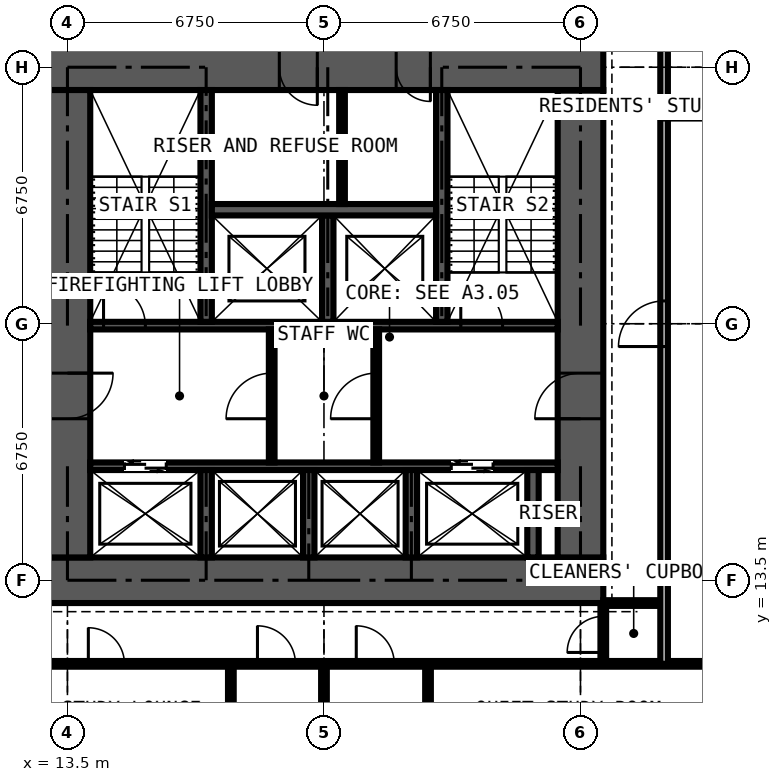
"""IFC4 building model, lengths in metres.
Left out: names, types, materials, properties, quantities, classifications, styles, units other than length and angle.
Written with IfcOpenShell. Run it as: python <this file> out.ifc"""

import sys

from ifc_helpers import new_model, si_unit, direction, frame, frame_2d, origin, place, context, subcontext, project, spatial, rectangle, extrude, element, fill, save


model = new_model("IFC4")
c1 = context("Model", 3, precision=1e-05, world=origin(), true_north=direction((0.0, 1.0)))
c2 = subcontext(c1, "Body", "Model", "MODEL_VIEW")
j1 = project(units=[si_unit("LENGTHUNIT", "METRE"), si_unit("PLANEANGLEUNIT", "RADIAN")], contexts=[c1])
p1 = place(None, origin())
s1 = spatial("IfcSite", under=j1, at=p1, CompositionType="ELEMENT")
p2 = place(p1, origin())
s2 = spatial("IfcBuilding", under=s1, at=p2, CompositionType="ELEMENT")
p3 = place(p2, frame((0.0, 0.0, 83.7)))
s3 = spatial("IfcBuildingStorey", under=s2, at=p3, CompositionType="ELEMENT", Elevation=83.7)
p4 = place(p3, frame((12.9, 13.5, 0.0), z_axis=(0.0, 0.0, 1.0), x_axis=(1.0, 0.0, 0.0)))
e1 = element("IfcWall", 1, at=p4, inside=s3, PredefinedType="SHEAR", context=c2, shape_type="SweptSolid", body=[
    extrude(rectangle(XDim=14.7, YDim=1.2, at=frame_2d((7.35, 0.0))), origin(), (0.0, 0.0, 1.0), 3.6),
])
p5 = place(p3, frame((27.0, 14.1, 0.0), z_axis=(0.0, 0.0, 1.0), x_axis=(0.0, 1.0, 0.0)))
e2 = element("IfcWall", 2, at=p5, inside=s3, PredefinedType="SHEAR", context=c2, shape_type="SweptSolid", body=[
    extrude(rectangle(XDim=12.3, YDim=1.2, at=frame_2d((6.15, 0.0))), origin(), (0.0, 0.0, 1.0), 3.6),
])
p6 = place(p5, frame((3.65, 0.0, 0.0)))
e3 = element("IfcOpeningElement", 3, at=p6, cuts=e2, PredefinedType="OPENING", context=c2, shape_type="SweptSolid", body=[
    extrude(rectangle(XDim=1.2, YDim=2.2, at=frame_2d((0.6, 1.1))), frame((0.0, 0.61, 0.0), z_axis=(0.0, -1.0, 0.0), x_axis=(1.0, 0.0, 0.0)), (0.0, 0.0, 1.0), 1.22),
])
p7 = place(p3, frame((27.6, 27.0, 0.0), z_axis=(0.0, 0.0, 1.0), x_axis=(-1.0, 0.0, 0.0)))
e4 = element("IfcWall", 4, at=p7, inside=s3, PredefinedType="SHEAR", context=c2, shape_type="SweptSolid", body=[
    extrude(rectangle(XDim=14.7, YDim=1.2, at=frame_2d((7.35, 0.0))), origin(), (0.0, 0.0, 1.0), 3.6),
])
p8 = place(p7, frame((4.55, 0.0, 0.0)))
e5 = element("IfcOpeningElement", 5, at=p8, cuts=e4, PredefinedType="OPENING", context=c2, shape_type="SweptSolid", body=[
    extrude(rectangle(XDim=0.9, YDim=2.2, at=frame_2d((0.45, 1.1))), frame((0.0, 0.61, 0.0), z_axis=(0.0, -1.0, 0.0), x_axis=(1.0, 0.0, 0.0)), (0.0, 0.0, 1.0), 1.22),
])
p9 = place(p7, frame((7.525, 0.0, 0.0)))
e6 = element("IfcOpeningElement", 6, at=p9, cuts=e4, PredefinedType="OPENING", context=c2, shape_type="SweptSolid", body=[
    extrude(rectangle(XDim=1.0, YDim=2.2, at=frame_2d((0.5, 1.1))), frame((0.0, 0.61, 0.0), z_axis=(0.0, -1.0, 0.0), x_axis=(1.0, 0.0, 0.0)), (0.0, 0.0, 1.0), 1.22),
])
p10 = place(p3, frame((13.5, 26.4, 0.0), z_axis=(0.0, 0.0, 1.0), x_axis=(0.0, -1.0, 0.0)))
e7 = element("IfcWall", 7, at=p10, inside=s3, PredefinedType="SHEAR", context=c2, shape_type="SweptSolid", body=[
    extrude(rectangle(XDim=12.3, YDim=1.2, at=frame_2d((6.15, 0.0))), origin(), (0.0, 0.0, 1.0), 3.6),
])
p11 = place(p10, frame((7.45, 0.0, 0.0)))
e8 = element("IfcOpeningElement", 8, at=p11, cuts=e7, PredefinedType="OPENING", context=c2, shape_type="SweptSolid", body=[
    extrude(rectangle(XDim=1.2, YDim=2.2, at=frame_2d((0.6, 1.1))), frame((0.0, 0.61, 0.0), z_axis=(0.0, -1.0, 0.0), x_axis=(1.0, 0.0, 0.0)), (0.0, 0.0, 1.0), 1.22),
])
p12 = place(p3, frame((14.1, 16.5, 0.0), z_axis=(0.0, 0.0, 1.0), x_axis=(1.0, 0.0, 0.0)))
e9 = element("IfcWall", 9, at=p12, inside=s3, PredefinedType="SHEAR", context=c2, shape_type="SweptSolid", body=[
    extrude(rectangle(XDim=12.3, YDim=0.2, at=frame_2d((6.15, 0.0))), origin(), (0.0, 0.0, 1.0), 3.6),
])
p13 = place(p12, frame((0.9, 0.0, 0.0)))
e10 = element("IfcOpeningElement", 10, at=p13, cuts=e9, PredefinedType="OPENING", context=c2, shape_type="SweptSolid", body=[
    extrude(rectangle(XDim=1.1, YDim=2.2, at=frame_2d((0.55, 1.1))), frame((0.0, 0.11, 0.0), z_axis=(0.0, -1.0, 0.0), x_axis=(1.0, 0.0, 0.0)), (0.0, 0.0, 1.0), 0.22),
])
p14 = place(p12, frame((9.5, 0.0, 0.0)))
e11 = element("IfcOpeningElement", 11, at=p14, cuts=e9, PredefinedType="OPENING", context=c2, shape_type="SweptSolid", body=[
    extrude(rectangle(XDim=1.1, YDim=2.2, at=frame_2d((0.55, 1.1))), frame((0.0, 0.11, 0.0), z_axis=(0.0, -1.0, 0.0), x_axis=(1.0, 0.0, 0.0)), (0.0, 0.0, 1.0), 0.22),
])
p15 = place(p3, frame((14.1, 20.2, 0.0), z_axis=(0.0, 0.0, 1.0), x_axis=(1.0, 0.0, 0.0)))
e12 = element("IfcWall", 12, at=p15, inside=s3, PredefinedType="SHEAR", context=c2, shape_type="SweptSolid", body=[
    extrude(rectangle(XDim=12.3, YDim=0.2, at=frame_2d((6.15, 0.0))), origin(), (0.0, 0.0, 1.0), 3.6),
])
p16 = place(p15, frame((0.35, 0.0, 0.0)))
e13 = element("IfcOpeningElement", 13, at=p16, cuts=e12, PredefinedType="OPENING", context=c2, shape_type="SweptSolid", body=[
    extrude(rectangle(XDim=1.1, YDim=2.2, at=frame_2d((0.55, 1.1))), frame((0.0, 0.11, 0.0), z_axis=(0.0, -1.0, 0.0), x_axis=(1.0, 0.0, 0.0)), (0.0, 0.0, 1.0), 0.22),
])
p17 = place(p15, frame((9.75, 0.0, 0.0)))
e14 = element("IfcOpeningElement", 14, at=p17, cuts=e12, PredefinedType="OPENING", context=c2, shape_type="SweptSolid", body=[
    extrude(rectangle(XDim=1.1, YDim=2.2, at=frame_2d((0.55, 1.1))), frame((0.0, 0.11, 0.0), z_axis=(0.0, -1.0, 0.0), x_axis=(1.0, 0.0, 0.0)), (0.0, 0.0, 1.0), 0.22),
])
for number, where, z_axis, x_axis in (
    (15, (17.15, 20.3, 0.0), (0.0, 0.0, 1.0), (0.0, 1.0, 0.0)),
    (16, (23.35, 20.3, 0.0), (0.0, 0.0, 1.0), (0.0, 1.0, 0.0)),
):
    element("IfcWall", number, at=place(p3, frame(where, z_axis=z_axis, x_axis=x_axis)), inside=s3, PredefinedType="SHEAR", context=c2, shape_type="SweptSolid", body=[
        extrude(rectangle(XDim=6.1, YDim=0.3, at=frame_2d((3.05, 0.0))), origin(), (0.0, 0.0, 1.0), 3.6),
    ])
p18 = place(p3, frame((20.35, 20.3, 0.0), z_axis=(0.0, 0.0, 1.0), x_axis=(0.0, 1.0, 0.0)))
e17 = element("IfcWall", 17, at=p18, inside=s3, PredefinedType="SHEAR", context=c2, shape_type="SweptSolid", body=[
    extrude(rectangle(XDim=2.8, YDim=0.3, at=frame_2d((1.4, 0.0))), origin(), (0.0, 0.0, 1.0), 3.6),
])
p19 = place(p3, frame((17.3, 23.25, 0.0), z_axis=(0.0, 0.0, 1.0), x_axis=(1.0, 0.0, 0.0)))
e18 = element("IfcWall", 18, at=p19, inside=s3, PredefinedType="SHEAR", context=c2, shape_type="SweptSolid", body=[
    extrude(rectangle(XDim=5.9, YDim=0.3, at=frame_2d((2.95, 0.0))), origin(), (0.0, 0.0, 1.0), 3.6),
])
for number, where, z_axis, x_axis in (
    (19, (17.15, 14.1, 0.0), (0.0, 0.0, 1.0), (0.0, 1.0, 0.0)),
    (20, (19.85, 14.1, 0.0), (0.0, 0.0, 1.0), (0.0, 1.0, 0.0)),
    (21, (22.55, 14.1, 0.0), (0.0, 0.0, 1.0), (0.0, 1.0, 0.0)),
    (22, (25.75, 14.1, 0.0), (0.0, 0.0, 1.0), (0.0, 1.0, 0.0)),
):
    element("IfcWall", number, at=place(p3, frame(where, z_axis=z_axis, x_axis=x_axis)), inside=s3, PredefinedType="SHEAR", context=c2, shape_type="SweptSolid", body=[
        extrude(rectangle(XDim=2.3, YDim=0.3, at=frame_2d((1.15, 0.0))), origin(), (0.0, 0.0, 1.0), 3.6),
    ])
p20 = place(p3, frame((18.875, 16.6, 0.0), z_axis=(0.0, 0.0, 1.0), x_axis=(0.0, 1.0, 0.0)))
e23 = element("IfcWall", 23, at=p20, inside=s3, PredefinedType="PARTITIONING", context=c2, shape_type="SweptSolid", body=[
    extrude(rectangle(XDim=3.5, YDim=0.15, at=frame_2d((1.75, 0.0))), origin(), (0.0, 0.0, 1.0), 3.375),
])
p21 = place(p20, frame((1.15, 0.0, 0.0)))
e24 = element("IfcOpeningElement", 24, at=p21, cuts=e23, PredefinedType="OPENING", context=c2, shape_type="SweptSolid", body=[
    extrude(rectangle(XDim=1.2, YDim=2.2, at=frame_2d((0.6, 1.1))), frame((0.0, 0.085, 0.0), z_axis=(0.0, -1.0, 0.0), x_axis=(1.0, 0.0, 0.0)), (0.0, 0.0, 1.0), 0.17),
])
p22 = place(p3, frame((21.625, 16.6, 0.0), z_axis=(0.0, 0.0, 1.0), x_axis=(0.0, 1.0, 0.0)))
e25 = element("IfcWall", 25, at=p22, inside=s3, PredefinedType="PARTITIONING", context=c2, shape_type="SweptSolid", body=[
    extrude(rectangle(XDim=3.5, YDim=0.15, at=frame_2d((1.75, 0.0))), origin(), (0.0, 0.0, 1.0), 3.375),
])
p23 = place(p22, frame((1.15, 0.0, 0.0)))
e26 = element("IfcOpeningElement", 26, at=p23, cuts=e25, PredefinedType="OPENING", context=c2, shape_type="SweptSolid", body=[
    extrude(rectangle(XDim=1.2, YDim=2.2, at=frame_2d((0.6, 1.1))), frame((0.0, 0.085, 0.0), z_axis=(0.0, -1.0, 0.0), x_axis=(1.0, 0.0, 0.0)), (0.0, 0.0, 1.0), 0.17),
])
p24 = place(p3, frame((20.725, 23.4, 0.0), z_axis=(0.0, 0.0, 1.0), x_axis=(0.0, 1.0, 0.0)))
e27 = element("IfcWall", 27, at=p24, inside=s3, PredefinedType="PARTITIONING", context=c2, shape_type="SweptSolid", body=[
    extrude(rectangle(XDim=3.0, YDim=0.15, at=frame_2d((1.5, 0.0))), origin(), (0.0, 0.0, 1.0), 3.375),
])
p25 = place(p3, frame((10.125, 11.3, 0.0), z_axis=(0.0, 0.0, 1.0), x_axis=(1.0, 0.0, 0.0)))
e28 = element("IfcWall", 28, at=p25, inside=s3, PredefinedType="PARTITIONING", context=c2, shape_type="SweptSolid", body=[
    extrude(rectangle(XDim=20.675, YDim=0.15, at=frame_2d((10.337, 0.0))), origin(), (0.0, 0.0, 1.0), 3.375),
])
p26 = place(p25, frame((8.375, 0.0, 0.0)))
e29 = element("IfcOpeningElement", 29, at=p26, cuts=e28, PredefinedType="OPENING", context=c2, shape_type="SweptSolid", body=[
    extrude(rectangle(XDim=1.0, YDim=2.2, at=frame_2d((0.5, 1.1))), frame((0.0, 0.085, 0.0), z_axis=(0.0, -1.0, 0.0), x_axis=(1.0, 0.0, 0.0)), (0.0, 0.0, 1.0), 0.17),
])
p27 = place(p25, frame((10.975, 0.0, 0.0)))
e30 = element("IfcOpeningElement", 30, at=p27, cuts=e28, PredefinedType="OPENING", context=c2, shape_type="SweptSolid", body=[
    extrude(rectangle(XDim=1.0, YDim=2.2, at=frame_2d((0.5, 1.1))), frame((0.0, 0.085, 0.0), z_axis=(0.0, -1.0, 0.0), x_axis=(1.0, 0.0, 0.0)), (0.0, 0.0, 1.0), 0.17),
])
p28 = place(p25, frame((3.925, 0.0, 0.0)))
e31 = element("IfcOpeningElement", 31, at=p28, cuts=e28, PredefinedType="OPENING", context=c2, shape_type="SweptSolid", body=[
    extrude(rectangle(XDim=0.95, YDim=2.2, at=frame_2d((0.475, 1.1))), frame((0.0, 0.085, 0.0), z_axis=(0.0, -1.0, 0.0), x_axis=(1.0, 0.0, 0.0)), (0.0, 0.0, 1.0), 0.17),
])
p29 = place(p3, frame((17.8, 5.65, 0.0), z_axis=(0.0, 0.0, 1.0), x_axis=(0.0, 1.0, 0.0)))
e32 = element("IfcWall", 32, at=p29, inside=s3, PredefinedType="PARTITIONING", context=c2, shape_type="SweptSolid", body=[
    extrude(rectangle(XDim=5.65, YDim=0.15, at=frame_2d((2.825, 0.0))), origin(), (0.0, 0.0, 1.0), 3.375),
])
p30 = place(p3, frame((20.25, -0.734, 0.0), z_axis=(0.0, 0.0, 1.0), x_axis=(0.0, 1.0, 0.0)))
e33 = element("IfcWall", 33, at=p30, inside=s3, PredefinedType="PARTITIONING", context=c2, shape_type="SweptSolid", body=[
    extrude(rectangle(XDim=12.034, YDim=0.15, at=frame_2d((6.017, 0.0))), origin(), (0.0, 0.0, 1.0), 2.61),
])
p31 = place(p3, frame((22.988, 5.65, 0.0), z_axis=(0.0, 0.0, 1.0), x_axis=(0.0, 1.0, 0.0)))
e34 = element("IfcWall", 34, at=p31, inside=s3, PredefinedType="PARTITIONING", context=c2, shape_type="SweptSolid", body=[
    extrude(rectangle(XDim=5.65, YDim=0.15, at=frame_2d((2.825, 0.0))), origin(), (0.0, 0.0, 1.0), 3.375),
])
p32 = place(p3, frame((27.6, 11.3, 0.0), z_axis=(0.0, 0.0, 1.0), x_axis=(0.0, 1.0, 0.0)))
e35 = element("IfcWall", 35, at=p32, inside=s3, PredefinedType="PARTITIONING", context=c2, shape_type="SweptSolid", body=[
    extrude(rectangle(XDim=1.6, YDim=0.15, at=frame_2d((0.8, 0.0))), origin(), (0.0, 0.0, 1.0), 3.375),
])
p33 = place(p32, frame((0.3, 0.0, 0.0)))
e36 = element("IfcOpeningElement", 36, at=p33, cuts=e35, PredefinedType="OPENING", context=c2, shape_type="SweptSolid", body=[
    extrude(rectangle(XDim=0.95, YDim=2.2, at=frame_2d((0.475, 1.1))), frame((0.0, 0.085, 0.0), z_axis=(0.0, -1.0, 0.0), x_axis=(1.0, 0.0, 0.0)), (0.0, 0.0, 1.0), 0.17),
])
p34 = place(p3, frame((27.6, 12.9, 0.0), z_axis=(0.0, 0.0, 1.0), x_axis=(1.0, 0.0, 0.0)))
e37 = element("IfcWall", 37, at=p34, inside=s3, PredefinedType="PARTITIONING", context=c2, shape_type="SweptSolid", body=[
    extrude(rectangle(XDim=1.6, YDim=0.15, at=frame_2d((0.8, 0.0))), origin(), (0.0, 0.0, 1.0), 2.806),
])
p35 = place(p3, frame((29.2, 11.3, 0.0), z_axis=(0.0, 0.0, 1.0), x_axis=(0.0, 1.0, 0.0)))
e38 = element("IfcWall", 38, at=p35, inside=s3, PredefinedType="PARTITIONING", context=c2, shape_type="SweptSolid", body=[
    extrude(rectangle(XDim=17.9, YDim=0.2, at=frame_2d((8.95, 0.0))), origin(), (0.0, 0.0, 1.0), 3.375),
])
p36 = place(p35, frame((8.35, 0.0, 0.0)))
e39 = element("IfcOpeningElement", 39, at=p36, cuts=e38, PredefinedType="OPENING", context=c2, shape_type="SweptSolid", body=[
    extrude(rectangle(XDim=1.2, YDim=2.2, at=frame_2d((0.6, 1.1))), frame((0.0, 0.11, 0.0), z_axis=(0.0, -1.0, 0.0), x_axis=(1.0, 0.0, 0.0)), (0.0, 0.0, 1.0), 0.22),
])
p37 = place(p3, frame((29.2, 25.7, 0.0), z_axis=(0.0, 0.0, 1.0), x_axis=(1.0, 0.0, 0.0)))
e40 = element("IfcWall", 40, at=p37, inside=s3, PredefinedType="SHEAR", context=c2, shape_type="SweptSolid", body=[
    extrude(rectangle(XDim=3.45, YDim=0.1, at=frame_2d((1.725, 0.0))), origin(), (0.0, 0.0, 1.0), 3.375),
])
p38 = place(p13, origin())
e41 = element("IfcDoor", 41, at=p38, inside=s3, OperationType="DOUBLE_DOOR_SLIDING", PredefinedType="DOOR", context=c2, shape_type="SweptSolid", body=[
    extrude(rectangle(XDim=1.1, YDim=2.2, at=frame_2d((0.55, 1.1))), frame((0.0, 0.025, 0.0), z_axis=(0.0, -1.0, 0.0), x_axis=(1.0, 0.0, 0.0)), (0.0, 0.0, 1.0), 0.05),
])
fill(e10, e41)
p39 = place(p14, origin())
e42 = element("IfcDoor", 42, at=p39, inside=s3, OperationType="DOUBLE_DOOR_SLIDING", PredefinedType="DOOR", context=c2, shape_type="SweptSolid", body=[
    extrude(rectangle(XDim=1.1, YDim=2.2, at=frame_2d((0.55, 1.1))), frame((0.0, 0.025, 0.0), z_axis=(0.0, -1.0, 0.0), x_axis=(1.0, 0.0, 0.0)), (0.0, 0.0, 1.0), 0.05),
])
fill(e11, e42)
p40 = place(p11, origin())
e43 = element("IfcDoor", 43, at=p40, inside=s3, OperationType="DOUBLE_DOOR_SINGLE_SWING", PredefinedType="DOOR", context=c2, shape_type="SweptSolid", body=[
    extrude(rectangle(XDim=1.2, YDim=2.2, at=frame_2d((0.6, 1.1))), frame((0.0, 0.025, 0.0), z_axis=(0.0, -1.0, 0.0), x_axis=(1.0, 0.0, 0.0)), (0.0, 0.0, 1.0), 0.05),
])
fill(e8, e43)
p41 = place(p6, origin())
e44 = element("IfcDoor", 44, at=p41, inside=s3, OperationType="DOUBLE_DOOR_SINGLE_SWING", PredefinedType="DOOR", context=c2, shape_type="SweptSolid", body=[
    extrude(rectangle(XDim=1.2, YDim=2.2, at=frame_2d((0.6, 1.1))), frame((0.0, 0.025, 0.0), z_axis=(0.0, -1.0, 0.0), x_axis=(1.0, 0.0, 0.0)), (0.0, 0.0, 1.0), 0.05),
])
fill(e3, e44)
p42 = place(p21, origin())
e45 = element("IfcDoor", 45, at=p42, inside=s3, OperationType="DOUBLE_DOOR_SINGLE_SWING", PredefinedType="DOOR", context=c2, shape_type="SweptSolid", body=[
    extrude(rectangle(XDim=1.2, YDim=2.2, at=frame_2d((0.6, 1.1))), frame((0.0, 0.025, 0.0), z_axis=(0.0, -1.0, 0.0), x_axis=(1.0, 0.0, 0.0)), (0.0, 0.0, 1.0), 0.05),
])
fill(e24, e45)
p43 = place(p23, origin())
e46 = element("IfcDoor", 46, at=p43, inside=s3, OperationType="DOUBLE_DOOR_SINGLE_SWING", PredefinedType="DOOR", context=c2, shape_type="SweptSolid", body=[
    extrude(rectangle(XDim=1.2, YDim=2.2, at=frame_2d((0.6, 1.1))), frame((0.0, 0.025, 0.0), z_axis=(0.0, -1.0, 0.0), x_axis=(1.0, 0.0, 0.0)), (0.0, 0.0, 1.0), 0.05),
])
fill(e26, e46)
p44 = place(p8, origin())
e47 = element("IfcDoor", 47, at=p44, inside=s3, OperationType="SINGLE_SWING_LEFT", PredefinedType="DOOR", context=c2, shape_type="SweptSolid", body=[
    extrude(rectangle(XDim=0.9, YDim=2.2, at=frame_2d((0.45, 1.1))), frame((0.0, 0.4, 0.0), z_axis=(0.0, -1.0, 0.0), x_axis=(1.0, 0.0, 0.0)), (0.0, 0.0, 1.0), 0.8),
])
fill(e5, e47)
p45 = place(p9, origin())
e48 = element("IfcDoor", 48, at=p45, inside=s3, OperationType="SINGLE_SWING_LEFT", PredefinedType="DOOR", context=c2, shape_type="SweptSolid", body=[
    extrude(rectangle(XDim=1.0, YDim=2.2, at=frame_2d((0.5, 1.1))), frame((0.0, 0.025, 0.0), z_axis=(0.0, -1.0, 0.0), x_axis=(1.0, 0.0, 0.0)), (0.0, 0.0, 1.0), 0.05),
])
fill(e6, e48)
p46 = place(p16, origin())
e49 = element("IfcDoor", 49, at=p46, inside=s3, OperationType="SINGLE_SWING_LEFT", PredefinedType="DOOR", context=c2, shape_type="SweptSolid", body=[
    extrude(rectangle(XDim=1.1, YDim=2.2, at=frame_2d((0.55, 1.1))), frame((0.0, 0.025, 0.0), z_axis=(0.0, -1.0, 0.0), x_axis=(1.0, 0.0, 0.0)), (0.0, 0.0, 1.0), 0.05),
])
fill(e13, e49)
p47 = place(p17, origin())
e50 = element("IfcDoor", 50, at=p47, inside=s3, OperationType="SINGLE_SWING_LEFT", PredefinedType="DOOR", context=c2, shape_type="SweptSolid", body=[
    extrude(rectangle(XDim=1.1, YDim=2.2, at=frame_2d((0.55, 1.1))), frame((0.0, 0.025, 0.0), z_axis=(0.0, -1.0, 0.0), x_axis=(1.0, 0.0, 0.0)), (0.0, 0.0, 1.0), 0.05),
])
fill(e14, e50)
p48 = place(p33, origin())
e51 = element("IfcDoor", 51, at=p48, inside=s3, OperationType="SINGLE_SWING_LEFT", PredefinedType="DOOR", context=c2, shape_type="SweptSolid", body=[
    extrude(rectangle(XDim=0.95, YDim=2.2, at=frame_2d((0.475, 1.1))), frame((0.0, 0.025, 0.0), z_axis=(0.0, -1.0, 0.0), x_axis=(1.0, 0.0, 0.0)), (0.0, 0.0, 1.0), 0.05),
])
fill(e36, e51)
p49 = place(p26, origin())
e52 = element("IfcDoor", 52, at=p49, inside=s3, OperationType="SINGLE_SWING_LEFT", PredefinedType="DOOR", context=c2, shape_type="SweptSolid", body=[
    extrude(rectangle(XDim=1.0, YDim=2.2, at=frame_2d((0.5, 1.1))), frame((0.0, 0.025, 0.0), z_axis=(0.0, -1.0, 0.0), x_axis=(1.0, 0.0, 0.0)), (0.0, 0.0, 1.0), 0.05),
])
fill(e29, e52)
p50 = place(p27, origin())
e53 = element("IfcDoor", 53, at=p50, inside=s3, OperationType="SINGLE_SWING_LEFT", PredefinedType="DOOR", context=c2, shape_type="SweptSolid", body=[
    extrude(rectangle(XDim=1.0, YDim=2.2, at=frame_2d((0.5, 1.1))), frame((0.0, 0.025, 0.0), z_axis=(0.0, -1.0, 0.0), x_axis=(1.0, 0.0, 0.0)), (0.0, 0.0, 1.0), 0.05),
])
fill(e30, e53)
p51 = place(p28, origin())
e54 = element("IfcDoor", 54, at=p51, inside=s3, OperationType="SINGLE_SWING_LEFT", PredefinedType="DOOR", context=c2, shape_type="SweptSolid", body=[
    extrude(rectangle(XDim=0.95, YDim=2.2, at=frame_2d((0.475, 1.1))), frame((0.0, 0.025, 0.0), z_axis=(0.0, -1.0, 0.0), x_axis=(1.0, 0.0, 0.0)), (0.0, 0.0, 1.0), 0.05),
])
fill(e31, e54)
p52 = place(p36, origin())
e55 = element("IfcDoor", 55, at=p52, inside=s3, OperationType="DOUBLE_DOOR_SINGLE_SWING", PredefinedType="DOOR", context=c2, shape_type="SweptSolid", body=[
    extrude(rectangle(XDim=1.2, YDim=2.2, at=frame_2d((0.6, 1.1))), frame((0.0, 0.025, 0.0), z_axis=(0.0, -1.0, 0.0), x_axis=(1.0, 0.0, 0.0)), (0.0, 0.0, 1.0), 0.05),
])
fill(e39, e55)
save(model, sys.argv[1])
